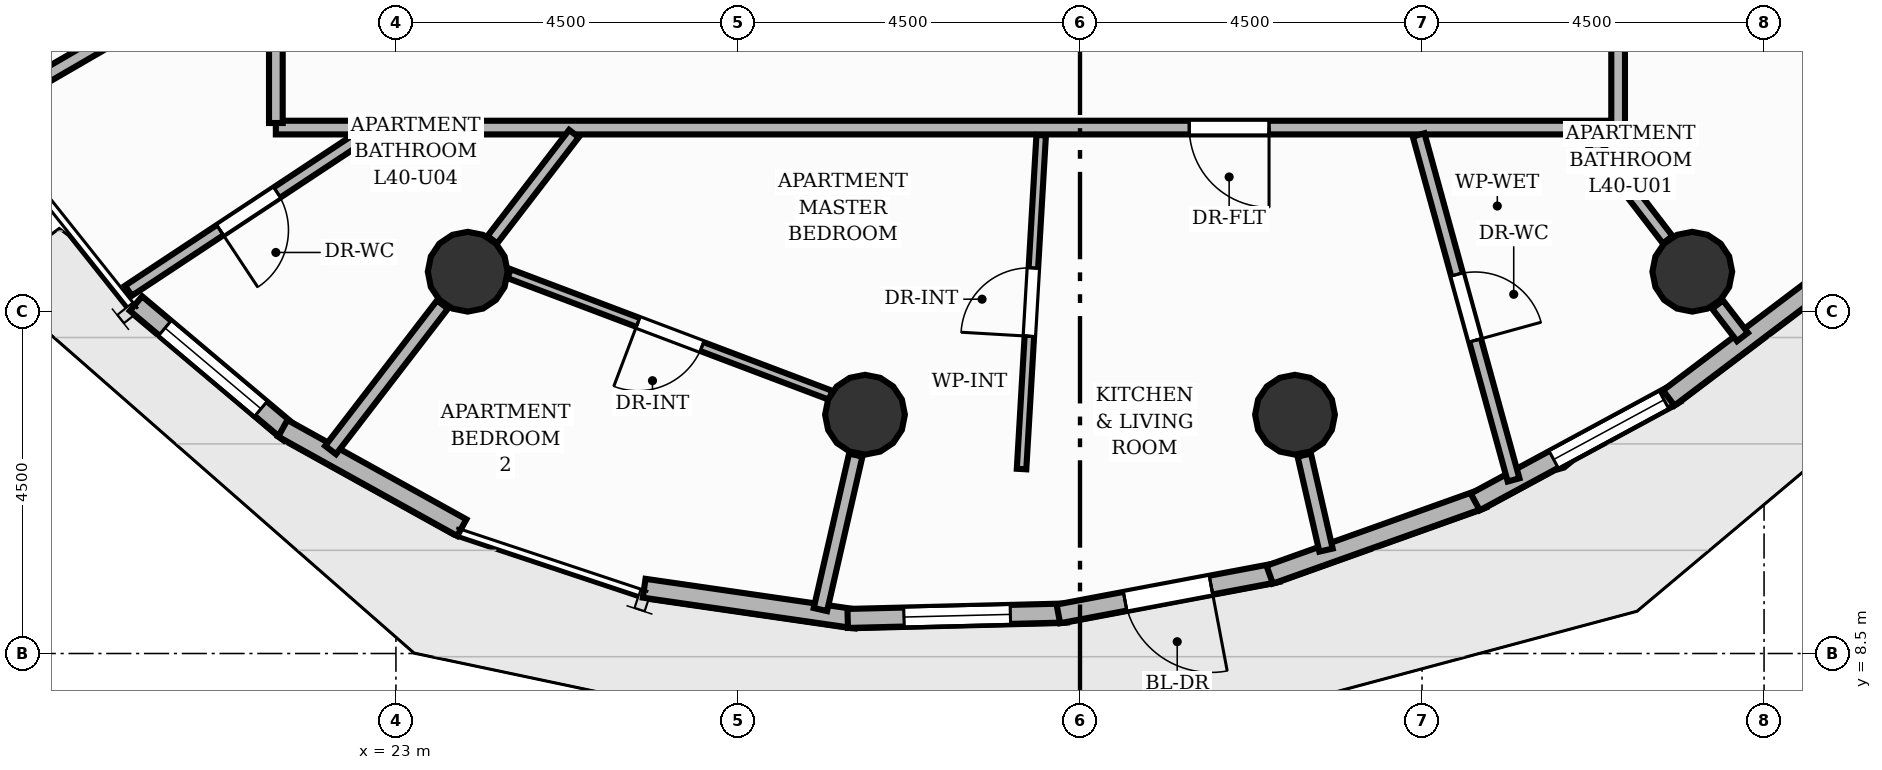
"""IFC4 building model, lengths in metres.
Left out: names, types, materials, properties, quantities, classifications, styles, units other than length and angle.
Written with IfcOpenShell. Run it as: python <this file> out.ifc"""

import sys

from ifc_helpers import new_model, si_unit, direction, frame, frame_2d, origin, origin_2d, place, context, subcontext, project, spatial, rectangle, circle, extrude, element, fill, save


model = new_model("IFC4")
c1 = context("Model", 3, precision=1e-05, world=origin(), true_north=direction((0.0, 1.0)))
c2 = subcontext(c1, "Body", "Model", "MODEL_VIEW")
j1 = project(units=[si_unit("LENGTHUNIT", "METRE"), si_unit("PLANEANGLEUNIT", "RADIAN")], contexts=[c1])
p1 = place(None, origin())
s1 = spatial("IfcSite", under=j1, at=p1, CompositionType="ELEMENT")
p2 = place(p1, origin())
s2 = spatial("IfcBuilding", under=s1, at=p2, CompositionType="ELEMENT")
p3 = place(p2, frame((0.0, 0.0, 136.16)))
s3 = spatial("IfcBuildingStorey", under=s2, at=p3, CompositionType="ELEMENT", Elevation=136.16)
for number, where, z_axis, x_axis in (
    (1, (23.944, 13.523, 0.0), (0.0, 0.0, 1.0), (1.0, 0.0, 0.0)),
    (2, (29.171, 11.642, 0.0), (0.0, 0.0, 1.0), (1.0, 0.0, 0.0)),
    (3, (34.829, 11.642, 0.0), (0.0, 0.0, 1.0), (1.0, 0.0, 0.0)),
    (4, (40.056, 13.523, 0.0), (0.0, 0.0, 1.0), (1.0, 0.0, 0.0)),
):
    element("IfcColumn", number, at=place(p3, frame(where, z_axis=z_axis, x_axis=x_axis)), inside=s3, PredefinedType="COLUMN", context=c2, shape_type="SweptSolid", body=[
        extrude(circle(Radius=0.525, at=origin_2d()), origin(), (0.0, 0.0, 1.0), 3.2),
    ])
p4 = place(p3, frame((21.605, 11.399, 0.0), z_axis=(0.0, 0.0, 1.0), x_axis=(-0.764825125467, 0.644237943197, 0.0)))
e5 = element("IfcWall", 5, at=p4, inside=s3, PredefinedType="SOLIDWALL", context=c2, shape_type="SweptSolid", body=[
    extrude(rectangle(XDim=2.648, YDim=0.25, at=frame_2d((1.324, 0.0))), origin(), (0.0, 0.0, 1.0), 2.96),
])
p5 = place(p4, frame((0.499, 0.0, 0.85)))
e6 = element("IfcOpeningElement", 6, at=p5, cuts=e5, PredefinedType="OPENING", context=c2, shape_type="SweptSolid", body=[
    extrude(rectangle(XDim=1.65, YDim=1.55, at=frame_2d((0.825, 0.775))), frame((0.0, 0.135, 0.0), z_axis=(0.0, -1.0, 0.0), x_axis=(1.0, 0.0, 0.0)), (0.0, 0.0, 1.0), 0.27),
])
p6 = place(p3, frame((23.866, 10.156, 0.0), z_axis=(0.0, 0.0, 1.0), x_axis=(-0.874341102682, 0.485311895755, 0.0)))
e7 = element("IfcWall", 7, at=p6, inside=s3, PredefinedType="SOLIDWALL", context=c2, shape_type="SweptSolid", body=[
    extrude(rectangle(XDim=2.693, YDim=0.25, at=frame_2d((1.346, 0.0))), origin(), (0.0, 0.0, 1.0), 2.96),
])
p7 = place(p3, frame((29.054, 8.955, 0.0), z_axis=(0.0, 0.0, 1.0), x_axis=(-0.98966505468, 0.143398324768, 0.0)))
e8 = element("IfcWall", 8, at=p7, inside=s3, PredefinedType="SOLIDWALL", context=c2, shape_type="SweptSolid", body=[
    extrude(rectangle(XDim=2.818, YDim=0.25, at=frame_2d((1.409, 0.0))), origin(), (0.0, 0.0, 1.0), 2.96),
])
p8 = place(p3, frame((31.824, 9.033, 0.0), z_axis=(0.0, 0.0, 1.0), x_axis=(-0.999687646408, -0.02499219116, 0.0)))
e9 = element("IfcWall", 9, at=p8, inside=s3, PredefinedType="SOLIDWALL", context=c2, shape_type="SweptSolid", body=[
    extrude(rectangle(XDim=2.882, YDim=0.25, at=frame_2d((1.441, 0.0))), origin(), (0.0, 0.0, 1.0), 2.96),
])
p9 = place(p8, frame((0.741, 0.0, 0.85)))
e10 = element("IfcOpeningElement", 10, at=p9, cuts=e9, PredefinedType="OPENING", context=c2, shape_type="SweptSolid", body=[
    extrude(rectangle(XDim=1.4, YDim=1.55, at=frame_2d((0.7, 0.775))), frame((0.0, 0.135, 0.0), z_axis=(0.0, -1.0, 0.0), x_axis=(1.0, 0.0, 0.0)), (0.0, 0.0, 1.0), 0.27),
])
p10 = place(p3, frame((34.601, 9.566, 0.0), z_axis=(0.0, 0.0, 1.0), x_axis=(-0.982637070109, -0.185538105108, 0.0)))
e11 = element("IfcWall", 11, at=p10, inside=s3, PredefinedType="SOLIDWALL", context=c2, shape_type="SweptSolid", body=[
    extrude(rectangle(XDim=2.937, YDim=0.25, at=frame_2d((1.469, 0.0))), origin(), (0.0, 0.0, 1.0), 2.96),
])
p11 = place(p10, frame((0.893, 0.0, 0.0)))
e12 = element("IfcOpeningElement", 12, at=p11, cuts=e11, PredefinedType="OPENING", context=c2, shape_type="SweptSolid", body=[
    extrude(rectangle(XDim=1.15, YDim=2.2, at=frame_2d((0.575, 1.1))), frame((0.0, 0.135, 0.0), z_axis=(0.0, -1.0, 0.0), x_axis=(1.0, 0.0, 0.0)), (0.0, 0.0, 1.0), 0.27),
])
p12 = place(p3, frame((37.299, 10.539, 0.0), z_axis=(0.0, 0.0, 1.0), x_axis=(-0.94175304307, -0.33630522724, 0.0)))
e13 = element("IfcWall", 13, at=p12, inside=s3, PredefinedType="SOLIDWALL", context=c2, shape_type="SweptSolid", body=[
    extrude(rectangle(XDim=2.977, YDim=0.25, at=frame_2d((1.489, 0.0))), origin(), (0.0, 0.0, 1.0), 2.96),
])
p13 = place(p3, frame((39.837, 11.921, 0.0), z_axis=(0.0, 0.0, 1.0), x_axis=(-0.879567466611, -0.475774181393, 0.0)))
e14 = element("IfcWall", 14, at=p13, inside=s3, PredefinedType="SOLIDWALL", context=c2, shape_type="SweptSolid", body=[
    extrude(rectangle(XDim=2.998, YDim=0.25, at=frame_2d((1.499, 0.0))), origin(), (0.0, 0.0, 1.0), 2.96),
])
p14 = place(p13, frame((0.175, 0.0, 0.85)))
e15 = element("IfcOpeningElement", 15, at=p14, cuts=e14, PredefinedType="OPENING", context=c2, shape_type="SweptSolid", body=[
    extrude(rectangle(XDim=1.65, YDim=1.55, at=frame_2d((0.825, 0.775))), frame((0.0, 0.135, 0.0), z_axis=(0.0, -1.0, 0.0), x_axis=(1.0, 0.0, 0.0)), (0.0, 0.0, 1.0), 0.27),
])
p15 = place(p3, frame((42.137, 13.671, 0.0), z_axis=(0.0, 0.0, 1.0), x_axis=(-0.797511213298, -0.603304122863, 0.0)))
e16 = element("IfcWall", 16, at=p15, inside=s3, PredefinedType="SOLIDWALL", context=c2, shape_type="SweptSolid", body=[
    extrude(rectangle(XDim=2.998, YDim=0.25, at=frame_2d((1.499, 0.0))), origin(), (0.0, 0.0, 1.0), 2.96),
])
p16 = place(p3, frame((19.472, 16.726, 0.0), z_axis=(0.0, 0.0, 1.0), x_axis=(-0.864844369658, -0.502040054448, 0.0)))
e17 = element("IfcWall", 17, at=p16, inside=s3, PredefinedType="PARTITIONING", context=c2, shape_type="SweptSolid", body=[
    extrude(rectangle(XDim=1.974, YDim=0.18, at=frame_2d((0.987, 0.0))), origin(), (0.0, 0.0, 1.0), 2.336),
])
p17 = place(p3, frame((23.612, 13.092, 0.0), z_axis=(0.0, 0.0, 1.0), x_axis=(-0.609549509747, -0.79274800231, 0.0)))
e18 = element("IfcWall", 18, at=p17, inside=s3, PredefinedType="PARTITIONING", context=c2, shape_type="SweptSolid", body=[
    extrude(rectangle(XDim=2.415, YDim=0.18, at=frame_2d((1.208, 0.0))), origin(), (0.0, 0.0, 1.0), 2.336),
])
p18 = place(p3, frame((29.05, 11.111, 0.0), z_axis=(0.0, 0.0, 1.0), x_axis=(-0.223063251486, -0.974803973031, 0.0)))
e19 = element("IfcWall", 19, at=p18, inside=s3, PredefinedType="PARTITIONING", context=c2, shape_type="SweptSolid", body=[
    extrude(rectangle(XDim=2.085, YDim=0.18, at=frame_2d((1.042, 0.0))), origin(), (0.0, 0.0, 1.0), 2.336),
])
p19 = place(p3, frame((34.95, 11.111, 0.0), z_axis=(0.0, 0.0, 1.0), x_axis=(0.223093561241, -0.974797036789, 0.0)))
e20 = element("IfcWall", 20, at=p19, inside=s3, PredefinedType="PARTITIONING", context=c2, shape_type="SweptSolid", body=[
    extrude(rectangle(XDim=1.282, YDim=0.18, at=frame_2d((0.641, 0.0))), origin(), (0.0, 0.0, 1.0), 2.336),
])
p20 = place(p3, frame((40.388, 13.092, 0.0), z_axis=(0.0, 0.0, 1.0), x_axis=(0.609469486836, -0.792809526063, 0.0)))
e21 = element("IfcWall", 21, at=p20, inside=s3, PredefinedType="PARTITIONING", context=c2, shape_type="SweptSolid", body=[
    extrude(rectangle(XDim=0.538, YDim=0.18, at=frame_2d((0.269, 0.0))), origin(), (0.0, 0.0, 1.0), 2.336),
])
p21 = place(p3, frame((39.08, 15.42, 0.0), z_axis=(0.0, 0.0, 1.0), x_axis=(-1.0, 0.0, 0.0)))
e22 = element("IfcWall", 22, at=p21, inside=s3, PredefinedType="PARTITIONING", context=c2, shape_type="SweptSolid", body=[
    extrude(rectangle(XDim=16.39, YDim=0.18, at=frame_2d((8.195, 0.0))), origin(), (0.0, 0.0, 1.0), 2.955),
])
p22 = place(p21, frame((4.593, 0.0, 0.0)))
e23 = element("IfcOpeningElement", 23, at=p22, cuts=e22, PredefinedType="OPENING", context=c2, shape_type="SweptSolid", body=[
    extrude(rectangle(XDim=1.05, YDim=2.15, at=frame_2d((0.525, 1.075))), frame((0.0, 0.1, 0.0), z_axis=(0.0, -1.0, 0.0), x_axis=(1.0, 0.0, 0.0)), (0.0, 0.0, 1.0), 0.2),
])
p23 = place(p3, frame((39.08, 32.58, 0.0), z_axis=(0.0, 0.0, 1.0), x_axis=(0.0, -1.0, 0.0)))
e24 = element("IfcWall", 24, at=p23, inside=s3, PredefinedType="PARTITIONING", context=c2, shape_type="SweptSolid", body=[
    extrude(rectangle(XDim=17.16, YDim=0.18, at=frame_2d((8.58, 0.0))), origin(), (0.0, 0.0, 1.0), 2.955),
])
p24 = place(p23, frame((9.64, 0.0, 0.0)))
e25 = element("IfcOpeningElement", 25, at=p24, cuts=e24, PredefinedType="OPENING", context=c2, shape_type="SweptSolid", body=[
    extrude(rectangle(XDim=1.05, YDim=2.15, at=frame_2d((0.525, 1.075))), frame((0.0, 0.1, 0.0), z_axis=(0.0, -1.0, 0.0), x_axis=(1.0, 0.0, 0.0)), (0.0, 0.0, 1.0), 0.2),
])
p25 = place(p3, frame((22.746, 15.42, 0.0), z_axis=(0.0, 0.0, 1.0), x_axis=(-1.0, 0.0, 0.0)))
e26 = element("IfcWall", 26, at=p25, inside=s3, PredefinedType="PARTITIONING", context=c2, shape_type="SweptSolid", body=[
    extrude(rectangle(XDim=1.326, YDim=0.18, at=frame_2d((0.663, 0.0))), origin(), (0.0, 0.0, 1.0), 2.955),
])
p26 = place(p3, frame((21.42, 15.48, 0.0), z_axis=(0.0, 0.0, 1.0), x_axis=(0.0, 1.0, 0.0)))
e27 = element("IfcWall", 27, at=p26, inside=s3, PredefinedType="PARTITIONING", context=c2, shape_type="SweptSolid", body=[
    extrude(rectangle(XDim=6.12, YDim=0.18, at=frame_2d((3.06, 0.0))), origin(), (0.0, 0.0, 1.0), 2.955),
])
p27 = place(p26, frame((2.167, 0.0, 0.0)))
e28 = element("IfcOpeningElement", 28, at=p27, cuts=e27, PredefinedType="OPENING", context=c2, shape_type="SweptSolid", body=[
    extrude(rectangle(XDim=1.05, YDim=2.15, at=frame_2d((0.525, 1.075))), frame((0.0, 0.1, 0.0), z_axis=(0.0, -1.0, 0.0), x_axis=(1.0, 0.0, 0.0)), (0.0, 0.0, 1.0), 0.2),
])
p28 = place(p3, frame((36.455, 15.323, 0.0), z_axis=(0.0, 0.0, 1.0), x_axis=(0.265393905211, -0.964140070258, 0.0)))
e29 = element("IfcWall", 29, at=p28, inside=s3, PredefinedType="PLUMBINGWALL", context=c2, shape_type="SweptSolid", body=[
    extrude(rectangle(XDim=4.708, YDim=0.16, at=frame_2d((2.354, 0.0))), origin(), (0.0, 0.0, 1.0), 2.955),
])
p29 = place(p28, frame((1.904, 0.0, 0.0)))
e30 = element("IfcOpeningElement", 30, at=p29, cuts=e29, PredefinedType="OPENING", context=c2, shape_type="SweptSolid", body=[
    extrude(rectangle(XDim=0.9, YDim=2.1, at=frame_2d((0.45, 1.05))), frame((0.0, 0.09, 0.0), z_axis=(0.0, -1.0, 0.0), x_axis=(1.0, 0.0, 0.0)), (0.0, 0.0, 1.0), 0.18),
])
p30 = place(p3, frame((31.231, 10.927, 0.0), z_axis=(0.0, 0.0, 1.0), x_axis=(0.058751291398, 0.998272651012, 0.0)))
e31 = element("IfcWall", 31, at=p30, inside=s3, PredefinedType="PARTITIONING", context=c2, shape_type="SweptSolid", body=[
    extrude(rectangle(XDim=4.401, YDim=0.125, at=frame_2d((2.2, 0.0))), origin(), (0.0, 0.0, 1.0), 2.692),
])
p31 = place(p30, frame((1.75, 0.0, 0.0)))
e32 = element("IfcOpeningElement", 32, at=p31, cuts=e31, PredefinedType="OPENING", context=c2, shape_type="SweptSolid", body=[
    extrude(rectangle(XDim=0.9, YDim=2.1, at=frame_2d((0.45, 1.05))), frame((0.0, 0.073, 0.0), z_axis=(0.0, -1.0, 0.0), x_axis=(1.0, 0.0, 0.0)), (0.0, 0.0, 1.0), 0.145),
])
p32 = place(p3, frame((38.658, 15.341, 0.0), z_axis=(0.0, 0.0, 1.0), x_axis=(0.609536601946, -0.792757927042, 0.0)))
e33 = element("IfcWall", 33, at=p32, inside=s3, PredefinedType="PLUMBINGWALL", context=c2, shape_type="SweptSolid", body=[
    extrude(rectangle(XDim=1.761, YDim=0.16, at=frame_2d((0.881, 0.0))), origin(), (0.0, 0.0, 1.0), 2.336),
])
p33 = place(p3, frame((28.722, 11.897, 0.0), z_axis=(0.0, 0.0, 1.0), x_axis=(-0.935309901838, 0.353829602385, 0.0)))
e34 = element("IfcWall", 34, at=p33, inside=s3, PredefinedType="PARTITIONING", context=c2, shape_type="SweptSolid", body=[
    extrude(rectangle(XDim=4.526, YDim=0.125, at=frame_2d((2.263, 0.0))), origin(), (0.0, 0.0, 1.0), 2.411),
])
p34 = place(p33, frame((1.813, 0.0, 0.0)))
e35 = element("IfcOpeningElement", 35, at=p34, cuts=e34, PredefinedType="OPENING", context=c2, shape_type="SweptSolid", body=[
    extrude(rectangle(XDim=0.9, YDim=2.1, at=frame_2d((0.45, 1.05))), frame((0.0, 0.073, 0.0), z_axis=(0.0, -1.0, 0.0), x_axis=(1.0, 0.0, 0.0)), (0.0, 0.0, 1.0), 0.145),
])
p35 = place(p3, frame((24.268, 13.944, 0.0), z_axis=(0.0, 0.0, 1.0), x_axis=(0.609536601946, 0.792757927042, 0.0)))
e36 = element("IfcWall", 36, at=p35, inside=s3, PredefinedType="PLUMBINGWALL", context=c2, shape_type="SweptSolid", body=[
    extrude(rectangle(XDim=1.761, YDim=0.16, at=frame_2d((0.881, 0.0))), origin(), (0.0, 0.0, 1.0), 2.336),
])
p36 = place(p3, frame((22.643, 15.365, 0.0), z_axis=(0.0, 0.0, 1.0), x_axis=(-0.83413433024, -0.551561346647, 0.0)))
e37 = element("IfcWall", 37, at=p36, inside=s3, PredefinedType="PLUMBINGWALL", context=c2, shape_type="SweptSolid", body=[
    extrude(rectangle(XDim=3.792, YDim=0.16, at=frame_2d((1.896, 0.0))), origin(), (0.0, 0.0, 1.0), 2.955),
])
p37 = place(p36, frame((1.446, 0.0, 0.0)))
e38 = element("IfcOpeningElement", 38, at=p37, cuts=e37, PredefinedType="OPENING", context=c2, shape_type="SweptSolid", body=[
    extrude(rectangle(XDim=0.9, YDim=2.1, at=frame_2d((0.45, 1.05))), frame((0.0, 0.09, 0.0), z_axis=(0.0, -1.0, 0.0), x_axis=(1.0, 0.0, 0.0)), (0.0, 0.0, 1.0), 0.18),
])
p38 = place(p11, origin())
e39 = element("IfcDoor", 39, at=p38, inside=s3, OperationType="SINGLE_SWING_LEFT", PredefinedType="DOOR", context=c2, shape_type="SweptSolid", body=[
    extrude(rectangle(XDim=1.15, YDim=2.2, at=frame_2d((0.575, 1.1))), frame((0.0, 0.025, 0.0), z_axis=(0.0, -1.0, 0.0), x_axis=(1.0, 0.0, 0.0)), (0.0, 0.0, 1.0), 0.05),
])
fill(e12, e39)
p39 = place(p5, origin())
e40 = element("IfcWindow", 40, at=p39, inside=s3, PartitioningType="SINGLE_PANEL", PredefinedType="WINDOW", context=c2, shape_type="SweptSolid", body=[
    extrude(rectangle(XDim=1.65, YDim=1.55, at=frame_2d((0.825, 0.775))), frame((0.0, 0.03, 0.0), z_axis=(0.0, -1.0, 0.0), x_axis=(1.0, 0.0, 0.0)), (0.0, 0.0, 1.0), 0.06),
])
fill(e6, e40)
p40 = place(p9, origin())
e41 = element("IfcWindow", 41, at=p40, inside=s3, PartitioningType="SINGLE_PANEL", PredefinedType="WINDOW", context=c2, shape_type="SweptSolid", body=[
    extrude(rectangle(XDim=1.4, YDim=1.55, at=frame_2d((0.7, 0.775))), frame((0.0, 0.03, 0.0), z_axis=(0.0, -1.0, 0.0), x_axis=(1.0, 0.0, 0.0)), (0.0, 0.0, 1.0), 0.06),
])
fill(e10, e41)
p41 = place(p14, origin())
e42 = element("IfcWindow", 42, at=p41, inside=s3, PartitioningType="SINGLE_PANEL", PredefinedType="WINDOW", context=c2, shape_type="SweptSolid", body=[
    extrude(rectangle(XDim=1.65, YDim=1.55, at=frame_2d((0.825, 0.775))), frame((0.0, 0.03, 0.0), z_axis=(0.0, -1.0, 0.0), x_axis=(1.0, 0.0, 0.0)), (0.0, 0.0, 1.0), 0.06),
])
fill(e15, e42)
p42 = place(p22, origin())
e43 = element("IfcDoor", 43, at=p42, inside=s3, OperationType="SINGLE_SWING_LEFT", PredefinedType="DOOR", context=c2, shape_type="SweptSolid", body=[
    extrude(rectangle(XDim=1.05, YDim=2.15, at=frame_2d((0.525, 1.075))), frame((0.0, 0.025, 0.0), z_axis=(0.0, -1.0, 0.0), x_axis=(1.0, 0.0, 0.0)), (0.0, 0.0, 1.0), 0.05),
])
fill(e23, e43)
p43 = place(p29, origin())
e44 = element("IfcDoor", 44, at=p43, inside=s3, OperationType="SINGLE_SWING_RIGHT", PredefinedType="DOOR", context=c2, shape_type="SweptSolid", body=[
    extrude(rectangle(XDim=0.9, YDim=2.1, at=frame_2d((0.45, 1.05))), frame((0.0, 0.025, 0.0), z_axis=(0.0, -1.0, 0.0), x_axis=(1.0, 0.0, 0.0)), (0.0, 0.0, 1.0), 0.05),
])
fill(e30, e44)
p44 = place(p31, origin())
e45 = element("IfcDoor", 45, at=p44, inside=s3, OperationType="SINGLE_SWING_LEFT", PredefinedType="DOOR", context=c2, shape_type="SweptSolid", body=[
    extrude(rectangle(XDim=0.9, YDim=2.1, at=frame_2d((0.45, 1.05))), frame((0.0, 0.025, 0.0), z_axis=(0.0, -1.0, 0.0), x_axis=(1.0, 0.0, 0.0)), (0.0, 0.0, 1.0), 0.05),
])
fill(e32, e45)
p45 = place(p34, origin())
e46 = element("IfcDoor", 46, at=p45, inside=s3, OperationType="SINGLE_SWING_RIGHT", PredefinedType="DOOR", context=c2, shape_type="SweptSolid", body=[
    extrude(rectangle(XDim=0.9, YDim=2.1, at=frame_2d((0.45, 1.05))), frame((0.0, 0.025, 0.0), z_axis=(0.0, -1.0, 0.0), x_axis=(1.0, 0.0, 0.0)), (0.0, 0.0, 1.0), 0.05),
])
fill(e35, e46)
p46 = place(p37, origin())
e47 = element("IfcDoor", 47, at=p46, inside=s3, OperationType="SINGLE_SWING_RIGHT", PredefinedType="DOOR", context=c2, shape_type="SweptSolid", body=[
    extrude(rectangle(XDim=0.9, YDim=2.1, at=frame_2d((0.45, 1.05))), frame((0.0, 0.025, 0.0), z_axis=(0.0, -1.0, 0.0), x_axis=(1.0, 0.0, 0.0)), (0.0, 0.0, 1.0), 0.05),
])
fill(e38, e47)
save(model, sys.argv[1])
